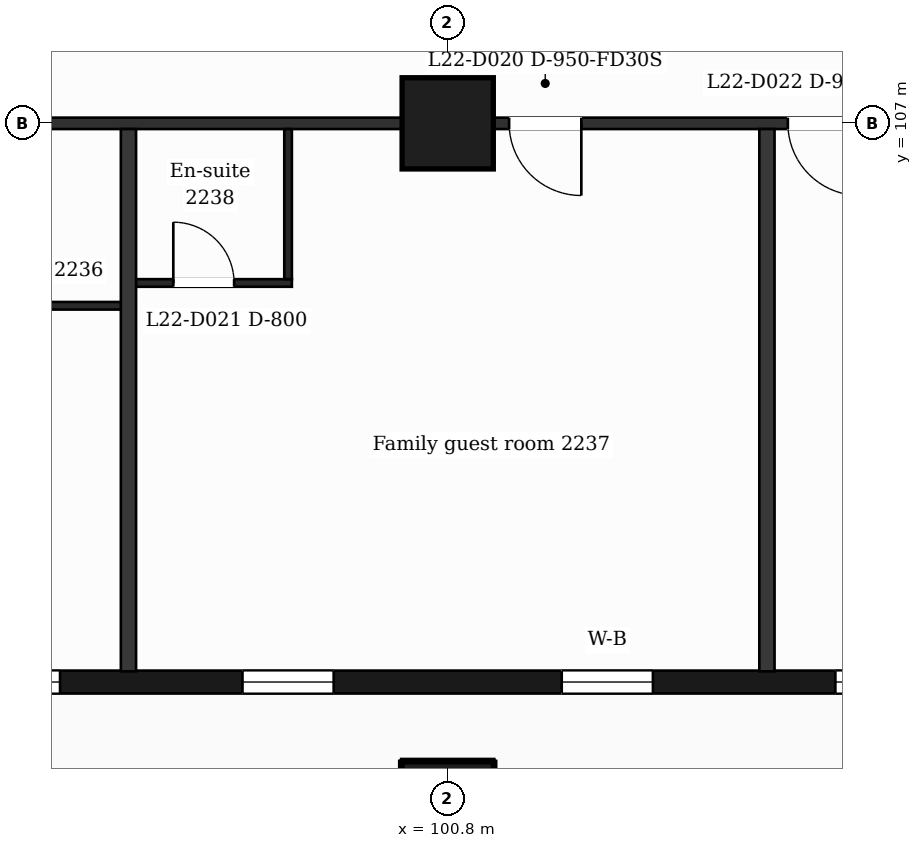
"""IFC4 building model, lengths in metres.
Left out: names, types, materials, properties, quantities, classifications, styles, units other than length and angle.
Written with IfcOpenShell. Run it as: python <this file> out.ifc"""

import sys

from ifc_helpers import new_model, si_unit, direction, frame, frame_2d, origin, origin_2d, place, context, subcontext, project, spatial, rectangle, extrude, element, fill, save


model = new_model("IFC4")
c1 = context("Model", 3, precision=1e-05, world=origin(), true_north=direction((0.0, 1.0)))
c2 = subcontext(c1, "Body", "Model", "MODEL_VIEW")
j1 = project(units=[si_unit("LENGTHUNIT", "METRE"), si_unit("PLANEANGLEUNIT", "RADIAN")], contexts=[c1])
p1 = place(None, origin())
s1 = spatial("IfcSite", under=j1, at=p1, CompositionType="ELEMENT")
p2 = place(p1, origin())
s2 = spatial("IfcBuilding", under=s1, at=p2, CompositionType="ELEMENT")
p3 = place(p2, frame((0.0, 0.0, 98.4)))
s3 = spatial("IfcBuildingStorey", under=s2, at=p3, CompositionType="ELEMENT", Elevation=98.4)
for number, where, z_axis, x_axis in (
    (1, (100.8, 98.0, 0.0), (0.0, 0.0, 1.0), (1.0, 0.0, 0.0)),
    (2, (100.8, 107.0, 0.0), (0.0, 0.0, 1.0), (1.0, 0.0, 0.0)),
):
    element("IfcColumn", number, at=place(p3, frame(where, z_axis=z_axis, x_axis=x_axis)), inside=s3, PredefinedType="COLUMN", context=c2, shape_type="SweptSolid", body=[
        extrude(rectangle(XDim=1.2, YDim=1.2, at=origin_2d()), origin(), (0.0, 0.0, 1.0), 3.7),
    ])
p4 = place(p3, frame((89.85, 99.65, 0.0), z_axis=(0.0, 0.0, 1.0), x_axis=(1.0, 0.0, 0.0)))
e3 = element("IfcWall", 3, at=p4, inside=s3, PredefinedType="SOLIDWALL", context=c2, shape_type="SweptSolid", body=[
    extrude(rectangle(XDim=47.25, YDim=0.3, at=frame_2d((23.625, 0.0))), origin(), (0.0, 0.0, 1.0), 3.38),
])
p5 = place(p4, frame((0.725, 0.0, 0.9)))
e4 = element("IfcOpeningElement", 4, at=p5, cuts=e3, PredefinedType="OPENING", context=c2, shape_type="SweptSolid", body=[
    extrude(rectangle(XDim=1.2, YDim=2.1, at=frame_2d((0.6, 1.05))), frame((0.0, 0.16, 0.0), z_axis=(0.0, -1.0, 0.0), x_axis=(1.0, 0.0, 0.0)), (0.0, 0.0, 1.0), 0.32),
])
p6 = place(p4, frame((3.45, 0.0, 0.9)))
e5 = element("IfcOpeningElement", 5, at=p6, cuts=e3, PredefinedType="OPENING", context=c2, shape_type="SweptSolid", body=[
    extrude(rectangle(XDim=2.4, YDim=2.1, at=frame_2d((1.2, 1.05))), frame((0.0, 0.16, 0.0), z_axis=(0.0, -1.0, 0.0), x_axis=(1.0, 0.0, 0.0)), (0.0, 0.0, 1.0), 0.32),
])
p7 = place(p4, frame((8.25, 0.0, 0.9)))
e6 = element("IfcOpeningElement", 6, at=p7, cuts=e3, PredefinedType="OPENING", context=c2, shape_type="SweptSolid", body=[
    extrude(rectangle(XDim=1.2, YDim=2.1, at=frame_2d((0.6, 1.05))), frame((0.0, 0.16, 0.0), z_axis=(0.0, -1.0, 0.0), x_axis=(1.0, 0.0, 0.0)), (0.0, 0.0, 1.0), 0.32),
])
p8 = place(p4, frame((12.45, 0.0, 0.9)))
e7 = element("IfcOpeningElement", 7, at=p8, cuts=e3, PredefinedType="OPENING", context=c2, shape_type="SweptSolid", body=[
    extrude(rectangle(XDim=1.2, YDim=2.1, at=frame_2d((0.6, 1.05))), frame((0.0, 0.16, 0.0), z_axis=(0.0, -1.0, 0.0), x_axis=(1.0, 0.0, 0.0)), (0.0, 0.0, 1.0), 0.32),
])
p9 = place(p4, frame((16.05, 0.0, 0.9)))
e8 = element("IfcOpeningElement", 8, at=p9, cuts=e3, PredefinedType="OPENING", context=c2, shape_type="SweptSolid", body=[
    extrude(rectangle(XDim=2.4, YDim=2.1, at=frame_2d((1.2, 1.05))), frame((0.0, 0.16, 0.0), z_axis=(0.0, -1.0, 0.0), x_axis=(1.0, 0.0, 0.0)), (0.0, 0.0, 1.0), 0.32),
])
p10 = place(p4, frame((20.25, 0.0, 0.9)))
e9 = element("IfcOpeningElement", 9, at=p10, cuts=e3, PredefinedType="OPENING", context=c2, shape_type="SweptSolid", body=[
    extrude(rectangle(XDim=2.4, YDim=2.1, at=frame_2d((1.2, 1.05))), frame((0.0, 0.16, 0.0), z_axis=(0.0, -1.0, 0.0), x_axis=(1.0, 0.0, 0.0)), (0.0, 0.0, 1.0), 0.32),
])
p11 = place(p4, frame((25.05, 0.0, 0.0)))
e10 = element("IfcOpeningElement", 10, at=p11, cuts=e3, PredefinedType="OPENING", context=c2, shape_type="SweptSolid", body=[
    extrude(rectangle(XDim=1.2, YDim=2.4, at=frame_2d((0.6, 1.2))), frame((0.0, 0.16, 0.0), z_axis=(0.0, -1.0, 0.0), x_axis=(1.0, 0.0, 0.0)), (0.0, 0.0, 1.0), 0.32),
])
p12 = place(p4, frame((28.65, 0.0, 0.9)))
e11 = element("IfcOpeningElement", 11, at=p12, cuts=e3, PredefinedType="OPENING", context=c2, shape_type="SweptSolid", body=[
    extrude(rectangle(XDim=2.4, YDim=2.1, at=frame_2d((1.2, 1.05))), frame((0.0, 0.16, 0.0), z_axis=(0.0, -1.0, 0.0), x_axis=(1.0, 0.0, 0.0)), (0.0, 0.0, 1.0), 0.32),
])
p13 = place(p4, frame((32.85, 0.0, 0.9)))
e12 = element("IfcOpeningElement", 12, at=p13, cuts=e3, PredefinedType="OPENING", context=c2, shape_type="SweptSolid", body=[
    extrude(rectangle(XDim=2.4, YDim=2.1, at=frame_2d((1.2, 1.05))), frame((0.0, 0.16, 0.0), z_axis=(0.0, -1.0, 0.0), x_axis=(1.0, 0.0, 0.0)), (0.0, 0.0, 1.0), 0.32),
])
p14 = place(p4, frame((37.65, 0.0, 0.9)))
e13 = element("IfcOpeningElement", 13, at=p14, cuts=e3, PredefinedType="OPENING", context=c2, shape_type="SweptSolid", body=[
    extrude(rectangle(XDim=1.2, YDim=2.1, at=frame_2d((0.6, 1.05))), frame((0.0, 0.16, 0.0), z_axis=(0.0, -1.0, 0.0), x_axis=(1.0, 0.0, 0.0)), (0.0, 0.0, 1.0), 0.32),
])
p15 = place(p4, frame((41.85, 0.0, 0.9)))
e14 = element("IfcOpeningElement", 14, at=p15, cuts=e3, PredefinedType="OPENING", context=c2, shape_type="SweptSolid", body=[
    extrude(rectangle(XDim=1.2, YDim=2.1, at=frame_2d((0.6, 1.05))), frame((0.0, 0.16, 0.0), z_axis=(0.0, -1.0, 0.0), x_axis=(1.0, 0.0, 0.0)), (0.0, 0.0, 1.0), 0.32),
])
p16 = place(p4, frame((45.25, 0.0, 0.9)))
e15 = element("IfcOpeningElement", 15, at=p16, cuts=e3, PredefinedType="OPENING", context=c2, shape_type="SweptSolid", body=[
    extrude(rectangle(XDim=1.2, YDim=2.1, at=frame_2d((0.6, 1.05))), frame((0.0, 0.16, 0.0), z_axis=(0.0, -1.0, 0.0), x_axis=(1.0, 0.0, 0.0)), (0.0, 0.0, 1.0), 0.32),
])
p17 = place(p3, frame((94.15, 104.6, 0.0), z_axis=(0.0, 0.0, 1.0), x_axis=(1.0, 0.0, 0.0)))
e16 = element("IfcWall", 16, at=p17, inside=s3, PredefinedType="PARTITIONING", context=c2, shape_type="SweptSolid", body=[
    extrude(rectangle(XDim=2.45, YDim=0.1, at=frame_2d((1.225, 0.0))), origin(), (0.0, 0.0, 1.0), 3.38),
])
p18 = place(p3, frame((96.6, 104.9, 0.0), z_axis=(0.0, 0.0, 1.0), x_axis=(1.0, 0.0, 0.0)))
e17 = element("IfcWall", 17, at=p18, inside=s3, PredefinedType="PARTITIONING", context=c2, shape_type="SweptSolid", body=[
    extrude(rectangle(XDim=2.15, YDim=0.1, at=frame_2d((1.075, 0.0))), origin(), (0.0, 0.0, 1.0), 3.38),
])
p19 = place(p18, frame((0.59, 0.0, 0.0)))
e18 = element("IfcOpeningElement", 18, at=p19, cuts=e17, PredefinedType="OPENING", context=c2, shape_type="SweptSolid", body=[
    extrude(rectangle(XDim=0.8, YDim=2.1, at=frame_2d((0.4, 1.05))), frame((0.0, 0.06, 0.0), z_axis=(0.0, -1.0, 0.0), x_axis=(1.0, 0.0, 0.0)), (0.0, 0.0, 1.0), 0.12),
])
p20 = place(p3, frame((87.018, 107.0, 0.0), z_axis=(0.0, 0.0, 1.0), x_axis=(1.0, 0.0, 0.0)))
e19 = element("IfcWall", 19, at=p20, inside=s3, PredefinedType="PARTITIONING", context=c2, shape_type="SweptSolid", body=[
    extrude(rectangle(XDim=52.765, YDim=0.15, at=frame_2d((26.382, 0.0))), origin(), (0.0, 0.0, 1.0), 3.38),
])
p21 = place(p20, frame((1.276, 0.0, 0.0)))
e20 = element("IfcOpeningElement", 20, at=p21, cuts=e19, PredefinedType="OPENING", context=c2, shape_type="SweptSolid", body=[
    extrude(rectangle(XDim=0.95, YDim=2.1, at=frame_2d((0.475, 1.05))), frame((0.0, 0.085, 0.0), z_axis=(0.0, -1.0, 0.0), x_axis=(1.0, 0.0, 0.0)), (0.0, 0.0, 1.0), 0.17),
])
p22 = place(p20, frame((6.152, 0.0, 0.0)))
e21 = element("IfcOpeningElement", 21, at=p22, cuts=e19, PredefinedType="OPENING", context=c2, shape_type="SweptSolid", body=[
    extrude(rectangle(XDim=0.95, YDim=2.1, at=frame_2d((0.475, 1.05))), frame((0.0, 0.085, 0.0), z_axis=(0.0, -1.0, 0.0), x_axis=(1.0, 0.0, 0.0)), (0.0, 0.0, 1.0), 0.17),
])
p23 = place(p20, frame((14.59, 0.0, 0.0)))
e22 = element("IfcOpeningElement", 22, at=p23, cuts=e19, PredefinedType="OPENING", context=c2, shape_type="SweptSolid", body=[
    extrude(rectangle(XDim=0.95, YDim=2.1, at=frame_2d((0.475, 1.05))), frame((0.0, 0.085, 0.0), z_axis=(0.0, -1.0, 0.0), x_axis=(1.0, 0.0, 0.0)), (0.0, 0.0, 1.0), 0.17),
])
p24 = place(p20, frame((18.257, 0.0, 0.0)))
e23 = element("IfcOpeningElement", 23, at=p24, cuts=e19, PredefinedType="OPENING", context=c2, shape_type="SweptSolid", body=[
    extrude(rectangle(XDim=0.95, YDim=2.1, at=frame_2d((0.475, 1.05))), frame((0.0, 0.085, 0.0), z_axis=(0.0, -1.0, 0.0), x_axis=(1.0, 0.0, 0.0)), (0.0, 0.0, 1.0), 0.17),
])
p25 = place(p20, frame((26.672, 0.0, 0.0)))
e24 = element("IfcOpeningElement", 24, at=p25, cuts=e19, PredefinedType="OPENING", context=c2, shape_type="SweptSolid", body=[
    extrude(rectangle(XDim=0.95, YDim=2.1, at=frame_2d((0.475, 1.05))), frame((0.0, 0.085, 0.0), z_axis=(0.0, -1.0, 0.0), x_axis=(1.0, 0.0, 0.0)), (0.0, 0.0, 1.0), 0.17),
])
p26 = place(p20, frame((31.392, 0.0, 0.0)))
e25 = element("IfcOpeningElement", 25, at=p26, cuts=e19, PredefinedType="OPENING", context=c2, shape_type="SweptSolid", body=[
    extrude(rectangle(XDim=0.95, YDim=2.1, at=frame_2d((0.475, 1.05))), frame((0.0, 0.085, 0.0), z_axis=(0.0, -1.0, 0.0), x_axis=(1.0, 0.0, 0.0)), (0.0, 0.0, 1.0), 0.17),
])
p27 = place(p20, frame((37.182, 0.0, 0.0)))
e26 = element("IfcOpeningElement", 26, at=p27, cuts=e19, PredefinedType="OPENING", context=c2, shape_type="SweptSolid", body=[
    extrude(rectangle(XDim=0.95, YDim=2.1, at=frame_2d((0.475, 1.05))), frame((0.0, 0.085, 0.0), z_axis=(0.0, -1.0, 0.0), x_axis=(1.0, 0.0, 0.0)), (0.0, 0.0, 1.0), 0.17),
])
p28 = place(p20, frame((41.762, 0.0, 0.0)))
e27 = element("IfcOpeningElement", 27, at=p28, cuts=e19, PredefinedType="OPENING", context=c2, shape_type="SweptSolid", body=[
    extrude(rectangle(XDim=0.95, YDim=2.1, at=frame_2d((0.475, 1.05))), frame((0.0, 0.085, 0.0), z_axis=(0.0, -1.0, 0.0), x_axis=(1.0, 0.0, 0.0)), (0.0, 0.0, 1.0), 0.17),
])
p29 = place(p20, frame((49.285, 0.0, 0.0)))
e28 = element("IfcOpeningElement", 28, at=p29, cuts=e19, PredefinedType="OPENING", context=c2, shape_type="SweptSolid", body=[
    extrude(rectangle(XDim=0.95, YDim=2.1, at=frame_2d((0.475, 1.05))), frame((0.0, 0.085, 0.0), z_axis=(0.0, -1.0, 0.0), x_axis=(1.0, 0.0, 0.0)), (0.0, 0.0, 1.0), 0.17),
])
p30 = place(p3, frame((96.6, 99.79, 0.0), z_axis=(0.0, 0.0, 1.0), x_axis=(0.0, 1.0, 0.0)))
e29 = element("IfcWall", 29, at=p30, inside=s3, PredefinedType="PARTITIONING", context=c2, shape_type="SweptSolid", body=[
    extrude(rectangle(XDim=7.135, YDim=0.2, at=frame_2d((3.567, 0.0))), origin(), (0.0, 0.0, 1.0), 3.38),
])
p31 = place(p3, frame((98.7, 104.95, 0.0), z_axis=(0.0, 0.0, 1.0), x_axis=(0.0, 1.0, 0.0)))
e30 = element("IfcWall", 30, at=p31, inside=s3, PredefinedType="PARTITIONING", context=c2, shape_type="SweptSolid", body=[
    extrude(rectangle(XDim=1.975, YDim=0.1, at=frame_2d((0.988, 0.0))), origin(), (0.0, 0.0, 1.0), 3.38),
])
p32 = place(p3, frame((105.0, 99.79, 0.0), z_axis=(0.0, 0.0, 1.0), x_axis=(0.0, 1.0, 0.0)))
e31 = element("IfcWall", 31, at=p32, inside=s3, PredefinedType="PARTITIONING", context=c2, shape_type="SweptSolid", body=[
    extrude(rectangle(XDim=7.135, YDim=0.2, at=frame_2d((3.567, 0.0))), origin(), (0.0, 0.0, 1.0), 3.38),
])
p33 = place(p6, origin())
e32 = element("IfcWindow", 32, at=p33, inside=s3, PartitioningType="SINGLE_PANEL", PredefinedType="WINDOW", context=c2, shape_type="SweptSolid", body=[
    extrude(rectangle(XDim=2.4, YDim=2.1, at=frame_2d((1.2, 1.05))), frame((0.0, 0.03, 0.0), z_axis=(0.0, -1.0, 0.0), x_axis=(1.0, 0.0, 0.0)), (0.0, 0.0, 1.0), 0.06),
])
fill(e5, e32)
p34 = place(p7, origin())
e33 = element("IfcWindow", 33, at=p34, inside=s3, PartitioningType="SINGLE_PANEL", PredefinedType="WINDOW", context=c2, shape_type="SweptSolid", body=[
    extrude(rectangle(XDim=1.2, YDim=2.1, at=frame_2d((0.6, 1.05))), frame((0.0, 0.03, 0.0), z_axis=(0.0, -1.0, 0.0), x_axis=(1.0, 0.0, 0.0)), (0.0, 0.0, 1.0), 0.06),
])
fill(e6, e33)
p35 = place(p8, origin())
e34 = element("IfcWindow", 34, at=p35, inside=s3, PartitioningType="SINGLE_PANEL", PredefinedType="WINDOW", context=c2, shape_type="SweptSolid", body=[
    extrude(rectangle(XDim=1.2, YDim=2.1, at=frame_2d((0.6, 1.05))), frame((0.0, 0.03, 0.0), z_axis=(0.0, -1.0, 0.0), x_axis=(1.0, 0.0, 0.0)), (0.0, 0.0, 1.0), 0.06),
])
fill(e7, e34)
p36 = place(p9, origin())
e35 = element("IfcWindow", 35, at=p36, inside=s3, PartitioningType="SINGLE_PANEL", PredefinedType="WINDOW", context=c2, shape_type="SweptSolid", body=[
    extrude(rectangle(XDim=2.4, YDim=2.1, at=frame_2d((1.2, 1.05))), frame((0.0, 0.03, 0.0), z_axis=(0.0, -1.0, 0.0), x_axis=(1.0, 0.0, 0.0)), (0.0, 0.0, 1.0), 0.06),
])
fill(e8, e35)
p37 = place(p23, origin())
e36 = element("IfcDoor", 36, at=p37, inside=s3, OperationType="SINGLE_SWING_RIGHT", PredefinedType="DOOR", context=c2, shape_type="SweptSolid", body=[
    extrude(rectangle(XDim=0.95, YDim=2.1, at=frame_2d((0.475, 1.05))), frame((0.0, 0.025, 0.0), z_axis=(0.0, -1.0, 0.0), x_axis=(1.0, 0.0, 0.0)), (0.0, 0.0, 1.0), 0.05),
])
fill(e22, e36)
p38 = place(p19, origin())
e37 = element("IfcDoor", 37, at=p38, inside=s3, OperationType="SINGLE_SWING_LEFT", PredefinedType="DOOR", context=c2, shape_type="SweptSolid", body=[
    extrude(rectangle(XDim=0.8, YDim=2.1, at=frame_2d((0.4, 1.05))), frame((0.0, 0.025, 0.0), z_axis=(0.0, -1.0, 0.0), x_axis=(1.0, 0.0, 0.0)), (0.0, 0.0, 1.0), 0.05),
])
fill(e18, e37)
p39 = place(p24, origin())
e38 = element("IfcDoor", 38, at=p39, inside=s3, OperationType="SINGLE_SWING_RIGHT", PredefinedType="DOOR", context=c2, shape_type="SweptSolid", body=[
    extrude(rectangle(XDim=0.95, YDim=2.1, at=frame_2d((0.475, 1.05))), frame((0.0, 0.025, 0.0), z_axis=(0.0, -1.0, 0.0), x_axis=(1.0, 0.0, 0.0)), (0.0, 0.0, 1.0), 0.05),
])
fill(e23, e38)
save(model, sys.argv[1])
